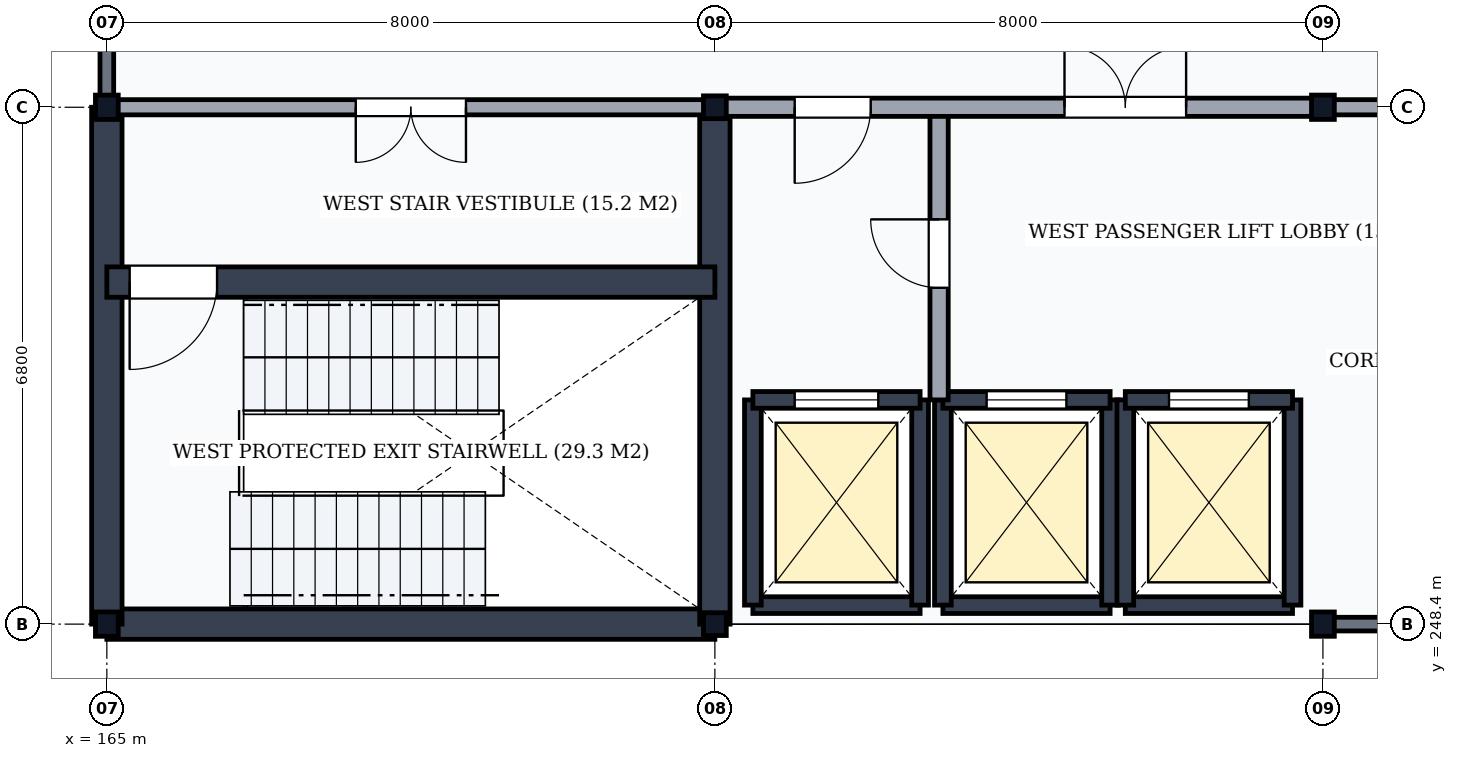
"""IFC4 building model, lengths in metres.
Left out: names, types, materials, properties, quantities, classifications, styles, units other than length and angle.
Written with IfcOpenShell. Run it as: python <this file> out.ifc"""

import sys

from ifc_helpers import new_model, si_unit, direction, frame, frame_2d, origin, origin_2d, place, context, subcontext, project, spatial, rectangle, i_section, extrude, element, fill, save


model = new_model("IFC4")
c1 = context("Model", 3, precision=1e-05, world=origin(), true_north=direction((0.0, 1.0)))
c2 = subcontext(c1, "Body", "Model", "MODEL_VIEW")
j1 = project(units=[si_unit("LENGTHUNIT", "METRE"), si_unit("PLANEANGLEUNIT", "RADIAN")], contexts=[c1])
p1 = place(None, origin())
s1 = spatial("IfcSite", under=j1, at=p1, CompositionType="ELEMENT")
p2 = place(p1, origin())
s2 = spatial("IfcBuilding", under=s1, at=p2, CompositionType="ELEMENT")
p3 = place(p2, frame((0.0, 0.0, 67.8)))
s3 = spatial("IfcBuildingStorey", under=s2, at=p3, CompositionType="ELEMENT", Elevation=67.8)
for number, where, z_axis, x_axis in (
    (1, (165.0, 248.4, 0.0), (0.0, 0.0, 1.0), (1.0, 0.0, 0.0)),
    (2, (165.0, 255.2, 0.0), (0.0, 0.0, 1.0), (1.0, 0.0, 0.0)),
):
    element("IfcColumn", number, at=place(p3, frame(where, z_axis=z_axis, x_axis=x_axis)), inside=s3, PredefinedType="COLUMN", context=c2, shape_type="SweptSolid", body=[
        extrude(i_section(OverallWidth=0.3, OverallDepth=0.32, WebThickness=0.011, FlangeThickness=0.021, FilletRadius=0.027, at=origin_2d()), origin(), (0.0, 0.0, 1.0), 4.5),
    ])
for number, where, z_axis, x_axis in (
    (3, (173.0, 248.4, 0.0), (0.0, 0.0, 1.0), (1.0, 0.0, 0.0)),
    (4, (173.0, 255.2, 0.0), (0.0, 0.0, 1.0), (1.0, 0.0, 0.0)),
):
    element("IfcColumn", number, at=place(p3, frame(where, z_axis=z_axis, x_axis=x_axis)), inside=s3, PredefinedType="COLUMN", context=c2, shape_type="SweptSolid", body=[
        extrude(i_section(OverallWidth=0.3, OverallDepth=0.3, WebThickness=0.011, FlangeThickness=0.019, FilletRadius=0.027, at=origin_2d()), origin(), (0.0, 0.0, 1.0), 4.5),
    ])
for number, where, z_axis, x_axis in (
    (5, (181.0, 248.4, 0.0), (0.0, 0.0, 1.0), (1.0, 0.0, 0.0)),
    (6, (181.0, 255.2, 0.0), (0.0, 0.0, 1.0), (1.0, 0.0, 0.0)),
):
    element("IfcColumn", number, at=place(p3, frame(where, z_axis=z_axis, x_axis=x_axis)), inside=s3, PredefinedType="COLUMN", context=c2, shape_type="SweptSolid", body=[
        extrude(i_section(OverallWidth=0.3, OverallDepth=0.32, WebThickness=0.011, FlangeThickness=0.021, FilletRadius=0.027, at=origin_2d()), origin(), (0.0, 0.0, 1.0), 4.5),
    ])
p4 = place(p3, frame((181.006, 248.4, 0.0), z_axis=(0.0, 0.0, 1.0), x_axis=(1.0, 0.0, 0.0)))
e7 = element("IfcWall", 7, at=p4, inside=s3, PredefinedType="SOLIDWALL", context=c2, shape_type="SweptSolid", body=[
    extrude(rectangle(XDim=7.988, YDim=0.18, at=frame_2d((3.994, 0.0))), origin(), (0.0, 0.0, 1.0), 3.988),
])
p5 = place(p4, frame((3.319, 0.0, 0.85)))
e8 = element("IfcOpeningElement", 8, at=p5, cuts=e7, PredefinedType="OPENING", context=c2, shape_type="SweptSolid", body=[
    extrude(rectangle(XDim=0.75, YDim=2.0, at=frame_2d((0.375, 1.0))), frame((0.0, 0.105, 0.0), z_axis=(0.0, -1.0, 0.0), x_axis=(1.0, 0.0, 0.0)), (0.0, 0.0, 1.0), 0.21),
])
p6 = place(p3, frame((165.0, 255.206, 0.0), z_axis=(0.0, 0.0, 1.0), x_axis=(0.0, 1.0, 0.0)))
e9 = element("IfcWall", 9, at=p6, inside=s3, PredefinedType="SOLIDWALL", context=c2, shape_type="SweptSolid", body=[
    extrude(rectangle(XDim=7.588, YDim=0.18, at=frame_2d((3.794, 0.0))), origin(), (0.0, 0.0, 1.0), 4.028),
])
p7 = place(p3, frame((165.0, 248.4, 0.0), z_axis=(0.0, 0.0, 1.0), x_axis=(1.0, 0.0, 0.0)))
e10 = element("IfcWall", 10, at=p7, inside=s3, PredefinedType="SHEAR", context=c2, shape_type="SweptSolid", body=[
    extrude(rectangle(XDim=8.0, YDim=0.4, at=frame_2d((4.0, 0.0))), origin(), (0.0, 0.0, 1.0), 4.3),
])
for number, where, z_axis, x_axis in (
    (11, (165.0, 248.4, 0.0), (0.0, 0.0, 1.0), (0.0, 1.0, 0.0)),
    (12, (173.0, 248.4, 0.0), (0.0, 0.0, 1.0), (0.0, 1.0, 0.0)),
):
    element("IfcWall", number, at=place(p3, frame(where, z_axis=z_axis, x_axis=x_axis)), inside=s3, PredefinedType="SHEAR", context=c2, shape_type="SweptSolid", body=[
        extrude(rectangle(XDim=6.8, YDim=0.4, at=frame_2d((3.4, 0.0))), origin(), (0.0, 0.0, 1.0), 4.3),
    ])
p8 = place(p3, frame((165.0, 252.9, 0.0), z_axis=(0.0, 0.0, 1.0), x_axis=(1.0, 0.0, 0.0)))
e13 = element("IfcWall", 13, at=p8, inside=s3, PredefinedType="SHEAR", context=c2, shape_type="SweptSolid", body=[
    extrude(rectangle(XDim=8.0, YDim=0.4, at=frame_2d((4.0, 0.0))), origin(), (0.0, 0.0, 1.0), 4.3),
])
p9 = place(p8, frame((0.3, 0.0, 0.0)))
e14 = element("IfcOpeningElement", 14, at=p9, cuts=e13, PredefinedType="OPENING", context=c2, shape_type="SweptSolid", body=[
    extrude(rectangle(XDim=1.15, YDim=2.15, at=frame_2d((0.575, 1.075))), frame((0.0, 0.215, 0.0), z_axis=(0.0, -1.0, 0.0), x_axis=(1.0, 0.0, 0.0)), (0.0, 0.0, 1.0), 0.43),
])
p10 = place(p3, frame((165.0, 255.2, 0.0), z_axis=(0.0, 0.0, 1.0), x_axis=(1.0, 0.0, 0.0)))
e15 = element("IfcWall", 15, at=p10, inside=s3, PredefinedType="PARTITIONING", context=c2, shape_type="SweptSolid", body=[
    extrude(rectangle(XDim=8.0, YDim=0.2, at=frame_2d((4.0, 0.0))), origin(), (0.0, 0.0, 1.0), 3.798),
])
p11 = place(p10, frame((3.275, 0.0, 0.0)))
e16 = element("IfcOpeningElement", 16, at=p11, cuts=e15, PredefinedType="OPENING", context=c2, shape_type="SweptSolid", body=[
    extrude(rectangle(XDim=1.45, YDim=2.2, at=frame_2d((0.725, 1.1))), frame((0.0, 0.115, 0.0), z_axis=(0.0, -1.0, 0.0), x_axis=(1.0, 0.0, 0.0)), (0.0, 0.0, 1.0), 0.23),
])
p12 = place(p3, frame((173.5, 248.65, 0.0), z_axis=(0.0, 0.0, 1.0), x_axis=(1.0, 0.0, 0.0)))
e17 = element("IfcWall", 17, at=p12, inside=s3, PredefinedType="SHEAR", context=c2, shape_type="SweptSolid", body=[
    extrude(rectangle(XDim=2.2, YDim=0.22, at=frame_2d((1.1, 0.0))), origin(), (0.0, 0.0, 1.0), 4.3),
])
for number, where, z_axis, x_axis in (
    (18, (173.5, 248.65, 0.0), (0.0, 0.0, 1.0), (0.0, 1.0, 0.0)),
    (19, (175.7, 248.65, 0.0), (0.0, 0.0, 1.0), (0.0, 1.0, 0.0)),
):
    element("IfcWall", number, at=place(p3, frame(where, z_axis=z_axis, x_axis=x_axis)), inside=s3, PredefinedType="SHEAR", context=c2, shape_type="SweptSolid", body=[
        extrude(rectangle(XDim=2.7, YDim=0.22, at=frame_2d((1.35, 0.0))), origin(), (0.0, 0.0, 1.0), 4.3),
    ])
p13 = place(p3, frame((173.5, 251.35, 0.0), z_axis=(0.0, 0.0, 1.0), x_axis=(1.0, 0.0, 0.0)))
e20 = element("IfcWall", 20, at=p13, inside=s3, PredefinedType="SHEAR", context=c2, shape_type="SweptSolid", body=[
    extrude(rectangle(XDim=2.2, YDim=0.22, at=frame_2d((1.1, 0.0))), origin(), (0.0, 0.0, 1.0), 4.3),
])
p14 = place(p13, frame((0.55, 0.0, 0.0)))
e21 = element("IfcOpeningElement", 21, at=p14, cuts=e20, PredefinedType="OPENING", context=c2, shape_type="SweptSolid", body=[
    extrude(rectangle(XDim=1.1, YDim=2.15, at=frame_2d((0.55, 1.075))), frame((0.0, 0.125, 0.0), z_axis=(0.0, -1.0, 0.0), x_axis=(1.0, 0.0, 0.0)), (0.0, 0.0, 1.0), 0.25),
])
p15 = place(p3, frame((176.0, 248.65, 0.0), z_axis=(0.0, 0.0, 1.0), x_axis=(1.0, 0.0, 0.0)))
e22 = element("IfcWall", 22, at=p15, inside=s3, PredefinedType="SHEAR", context=c2, shape_type="SweptSolid", body=[
    extrude(rectangle(XDim=2.2, YDim=0.22, at=frame_2d((1.1, 0.0))), origin(), (0.0, 0.0, 1.0), 4.3),
])
for number, where, z_axis, x_axis in (
    (23, (176.0, 248.65, 0.0), (0.0, 0.0, 1.0), (0.0, 1.0, 0.0)),
    (24, (178.2, 248.65, 0.0), (0.0, 0.0, 1.0), (0.0, 1.0, 0.0)),
):
    element("IfcWall", number, at=place(p3, frame(where, z_axis=z_axis, x_axis=x_axis)), inside=s3, PredefinedType="SHEAR", context=c2, shape_type="SweptSolid", body=[
        extrude(rectangle(XDim=2.7, YDim=0.22, at=frame_2d((1.35, 0.0))), origin(), (0.0, 0.0, 1.0), 4.3),
    ])
p16 = place(p3, frame((176.0, 251.35, 0.0), z_axis=(0.0, 0.0, 1.0), x_axis=(1.0, 0.0, 0.0)))
e25 = element("IfcWall", 25, at=p16, inside=s3, PredefinedType="SHEAR", context=c2, shape_type="SweptSolid", body=[
    extrude(rectangle(XDim=2.2, YDim=0.22, at=frame_2d((1.1, 0.0))), origin(), (0.0, 0.0, 1.0), 4.3),
])
p17 = place(p16, frame((0.575, 0.0, 0.0)))
e26 = element("IfcOpeningElement", 26, at=p17, cuts=e25, PredefinedType="OPENING", context=c2, shape_type="SweptSolid", body=[
    extrude(rectangle(XDim=1.05, YDim=2.15, at=frame_2d((0.525, 1.075))), frame((0.0, 0.125, 0.0), z_axis=(0.0, -1.0, 0.0), x_axis=(1.0, 0.0, 0.0)), (0.0, 0.0, 1.0), 0.25),
])
p18 = place(p3, frame((178.4, 248.65, 0.0), z_axis=(0.0, 0.0, 1.0), x_axis=(1.0, 0.0, 0.0)))
e27 = element("IfcWall", 27, at=p18, inside=s3, PredefinedType="SHEAR", context=c2, shape_type="SweptSolid", body=[
    extrude(rectangle(XDim=2.2, YDim=0.22, at=frame_2d((1.1, 0.0))), origin(), (0.0, 0.0, 1.0), 4.3),
])
for number, where, z_axis, x_axis in (
    (28, (178.4, 248.65, 0.0), (0.0, 0.0, 1.0), (0.0, 1.0, 0.0)),
    (29, (180.6, 248.65, 0.0), (0.0, 0.0, 1.0), (0.0, 1.0, 0.0)),
):
    element("IfcWall", number, at=place(p3, frame(where, z_axis=z_axis, x_axis=x_axis)), inside=s3, PredefinedType="SHEAR", context=c2, shape_type="SweptSolid", body=[
        extrude(rectangle(XDim=2.7, YDim=0.22, at=frame_2d((1.35, 0.0))), origin(), (0.0, 0.0, 1.0), 4.3),
    ])
p19 = place(p3, frame((178.4, 251.35, 0.0), z_axis=(0.0, 0.0, 1.0), x_axis=(1.0, 0.0, 0.0)))
e30 = element("IfcWall", 30, at=p19, inside=s3, PredefinedType="SHEAR", context=c2, shape_type="SweptSolid", body=[
    extrude(rectangle(XDim=2.2, YDim=0.22, at=frame_2d((1.1, 0.0))), origin(), (0.0, 0.0, 1.0), 4.3),
])
p20 = place(p19, frame((0.575, 0.0, 0.0)))
e31 = element("IfcOpeningElement", 31, at=p20, cuts=e30, PredefinedType="OPENING", context=c2, shape_type="SweptSolid", body=[
    extrude(rectangle(XDim=1.05, YDim=2.15, at=frame_2d((0.525, 1.075))), frame((0.0, 0.125, 0.0), z_axis=(0.0, -1.0, 0.0), x_axis=(1.0, 0.0, 0.0)), (0.0, 0.0, 1.0), 0.25),
])
p21 = place(p3, frame((175.95, 251.35, 0.0), z_axis=(0.0, 0.0, 1.0), x_axis=(0.0, 1.0, 0.0)))
e32 = element("IfcWall", 32, at=p21, inside=s3, PredefinedType="PARTITIONING", context=c2, shape_type="SweptSolid", body=[
    extrude(rectangle(XDim=3.85, YDim=0.24, at=frame_2d((1.925, 0.0))), origin(), (0.0, 0.0, 1.0), 4.3),
])
p22 = place(p21, frame((1.475, 0.0, 0.0)))
e33 = element("IfcOpeningElement", 33, at=p22, cuts=e32, PredefinedType="OPENING", context=c2, shape_type="SweptSolid", body=[
    extrude(rectangle(XDim=0.9, YDim=2.1, at=frame_2d((0.45, 1.05))), frame((0.0, 0.135, 0.0), z_axis=(0.0, -1.0, 0.0), x_axis=(1.0, 0.0, 0.0)), (0.0, 0.0, 1.0), 0.27),
])
p23 = place(p3, frame((173.0, 255.2, 0.0), z_axis=(0.0, 0.0, 1.0), x_axis=(1.0, 0.0, 0.0)))
e34 = element("IfcWall", 34, at=p23, inside=s3, PredefinedType="PARTITIONING", context=c2, shape_type="SweptSolid", body=[
    extrude(rectangle(XDim=8.0, YDim=0.24, at=frame_2d((4.0, 0.0))), origin(), (0.0, 0.0, 1.0), 3.798),
])
p24 = place(p23, frame((1.05, 0.0, 0.0)))
e35 = element("IfcOpeningElement", 35, at=p24, cuts=e34, PredefinedType="OPENING", context=c2, shape_type="SweptSolid", body=[
    extrude(rectangle(XDim=1.0, YDim=2.1, at=frame_2d((0.5, 1.05))), frame((0.0, 0.135, 0.0), z_axis=(0.0, -1.0, 0.0), x_axis=(1.0, 0.0, 0.0)), (0.0, 0.0, 1.0), 0.27),
])
p25 = place(p23, frame((4.6, 0.0, 0.0)))
e36 = element("IfcOpeningElement", 36, at=p25, cuts=e34, PredefinedType="OPENING", context=c2, shape_type="SweptSolid", body=[
    extrude(rectangle(XDim=1.6, YDim=2.25, at=frame_2d((0.8, 1.125))), frame((0.0, 0.135, 0.0), z_axis=(0.0, -1.0, 0.0), x_axis=(1.0, 0.0, 0.0)), (0.0, 0.0, 1.0), 0.27),
])
p26 = place(p3, frame((181.0, 255.2, 0.0), z_axis=(0.0, 0.0, 1.0), x_axis=(1.0, 0.0, 0.0)))
e37 = element("IfcWall", 37, at=p26, inside=s3, PredefinedType="PARTITIONING", context=c2, shape_type="SweptSolid", body=[
    extrude(rectangle(XDim=8.0, YDim=0.2, at=frame_2d((4.0, 0.0))), origin(), (0.0, 0.0, 1.0), 3.798),
])
p27 = place(p26, frame((0.85, 0.0, 0.0)))
e38 = element("IfcOpeningElement", 38, at=p27, cuts=e37, PredefinedType="OPENING", context=c2, shape_type="SweptSolid", body=[
    extrude(rectangle(XDim=0.9, YDim=2.1, at=frame_2d((0.45, 1.05))), frame((0.0, 0.115, 0.0), z_axis=(0.0, -1.0, 0.0), x_axis=(1.0, 0.0, 0.0)), (0.0, 0.0, 1.0), 0.23),
])
p28 = place(p26, frame((3.25, 0.0, 0.0)))
e39 = element("IfcOpeningElement", 39, at=p28, cuts=e37, PredefinedType="OPENING", context=c2, shape_type="SweptSolid", body=[
    extrude(rectangle(XDim=0.9, YDim=2.1, at=frame_2d((0.45, 1.05))), frame((0.0, 0.115, 0.0), z_axis=(0.0, -1.0, 0.0), x_axis=(1.0, 0.0, 0.0)), (0.0, 0.0, 1.0), 0.23),
])
p29 = place(p26, frame((5.075, 0.0, 0.0)))
e40 = element("IfcOpeningElement", 40, at=p29, cuts=e37, PredefinedType="OPENING", context=c2, shape_type="SweptSolid", body=[
    extrude(rectangle(XDim=0.95, YDim=2.1, at=frame_2d((0.475, 1.05))), frame((0.0, 0.115, 0.0), z_axis=(0.0, -1.0, 0.0), x_axis=(1.0, 0.0, 0.0)), (0.0, 0.0, 1.0), 0.23),
])
p30 = place(p26, frame((6.5, 0.0, 0.0)))
e41 = element("IfcOpeningElement", 41, at=p30, cuts=e37, PredefinedType="OPENING", context=c2, shape_type="SweptSolid", body=[
    extrude(rectangle(XDim=0.85, YDim=2.1, at=frame_2d((0.425, 1.05))), frame((0.0, 0.115, 0.0), z_axis=(0.0, -1.0, 0.0), x_axis=(1.0, 0.0, 0.0)), (0.0, 0.0, 1.0), 0.23),
])
p31 = place(p9, frame((1.15, 0.0, 0.0), z_axis=(0.0, 0.0, 1.0), x_axis=(-1.0, 0.0, 0.0)))
e42 = element("IfcDoor", 42, at=p31, inside=s3, OperationType="SINGLE_SWING_RIGHT", PredefinedType="DOOR", context=c2, shape_type="SweptSolid", body=[
    extrude(rectangle(XDim=1.15, YDim=2.15, at=frame_2d((0.575, 1.075))), frame((0.0, 0.025, 0.0), z_axis=(0.0, -1.0, 0.0), x_axis=(1.0, 0.0, 0.0)), (0.0, 0.0, 1.0), 0.05),
])
fill(e14, e42)
p32 = place(p11, frame((1.45, 0.0, 0.0), z_axis=(0.0, 0.0, 1.0), x_axis=(-1.0, 0.0, 0.0)))
e43 = element("IfcDoor", 43, at=p32, inside=s3, OperationType="DOUBLE_DOOR_SINGLE_SWING", PredefinedType="DOOR", context=c2, shape_type="SweptSolid", body=[
    extrude(rectangle(XDim=1.45, YDim=2.2, at=frame_2d((0.725, 1.1))), frame((0.0, 0.025, 0.0), z_axis=(0.0, -1.0, 0.0), x_axis=(1.0, 0.0, 0.0)), (0.0, 0.0, 1.0), 0.05),
])
fill(e16, e43)
p33 = place(p14, origin())
e44 = element("IfcDoor", 44, at=p33, inside=s3, OperationType="DOUBLE_DOOR_SLIDING", PredefinedType="USERDEFINED", context=c2, shape_type="SweptSolid", body=[
    extrude(rectangle(XDim=1.1, YDim=2.15, at=frame_2d((0.55, 1.075))), frame((0.0, 0.025, 0.0), z_axis=(0.0, -1.0, 0.0), x_axis=(1.0, 0.0, 0.0)), (0.0, 0.0, 1.0), 0.05),
])
fill(e21, e44)
p34 = place(p17, origin())
e45 = element("IfcDoor", 45, at=p34, inside=s3, OperationType="DOUBLE_DOOR_SLIDING", PredefinedType="USERDEFINED", context=c2, shape_type="SweptSolid", body=[
    extrude(rectangle(XDim=1.05, YDim=2.15, at=frame_2d((0.525, 1.075))), frame((0.0, 0.025, 0.0), z_axis=(0.0, -1.0, 0.0), x_axis=(1.0, 0.0, 0.0)), (0.0, 0.0, 1.0), 0.05),
])
fill(e26, e45)
p35 = place(p20, origin())
e46 = element("IfcDoor", 46, at=p35, inside=s3, OperationType="DOUBLE_DOOR_SLIDING", PredefinedType="USERDEFINED", context=c2, shape_type="SweptSolid", body=[
    extrude(rectangle(XDim=1.05, YDim=2.15, at=frame_2d((0.525, 1.075))), frame((0.0, 0.025, 0.0), z_axis=(0.0, -1.0, 0.0), x_axis=(1.0, 0.0, 0.0)), (0.0, 0.0, 1.0), 0.05),
])
fill(e31, e46)
p36 = place(p22, frame((0.9, 0.0, 0.0), z_axis=(0.0, 0.0, 1.0), x_axis=(-1.0, 0.0, 0.0)))
e47 = element("IfcDoor", 47, at=p36, inside=s3, OperationType="SINGLE_SWING_LEFT", PredefinedType="DOOR", context=c2, shape_type="SweptSolid", body=[
    extrude(rectangle(XDim=0.9, YDim=2.1, at=frame_2d((0.45, 1.05))), frame((0.0, 0.025, 0.0), z_axis=(0.0, -1.0, 0.0), x_axis=(1.0, 0.0, 0.0)), (0.0, 0.0, 1.0), 0.05),
])
fill(e33, e47)
p37 = place(p24, frame((1.0, 0.0, 0.0), z_axis=(0.0, 0.0, 1.0), x_axis=(-1.0, 0.0, 0.0)))
e48 = element("IfcDoor", 48, at=p37, inside=s3, OperationType="SINGLE_SWING_RIGHT", PredefinedType="DOOR", context=c2, shape_type="SweptSolid", body=[
    extrude(rectangle(XDim=1.0, YDim=2.1, at=frame_2d((0.5, 1.05))), frame((0.0, 0.025, 0.0), z_axis=(0.0, -1.0, 0.0), x_axis=(1.0, 0.0, 0.0)), (0.0, 0.0, 1.0), 0.05),
])
fill(e35, e48)
p38 = place(p25, origin())
e49 = element("IfcDoor", 49, at=p38, inside=s3, OperationType="DOUBLE_DOOR_SINGLE_SWING", PredefinedType="DOOR", context=c2, shape_type="SweptSolid", body=[
    extrude(rectangle(XDim=1.6, YDim=2.25, at=frame_2d((0.8, 1.125))), frame((0.0, 0.025, 0.0), z_axis=(0.0, -1.0, 0.0), x_axis=(1.0, 0.0, 0.0)), (0.0, 0.0, 1.0), 0.05),
])
fill(e36, e49)
save(model, sys.argv[1])
